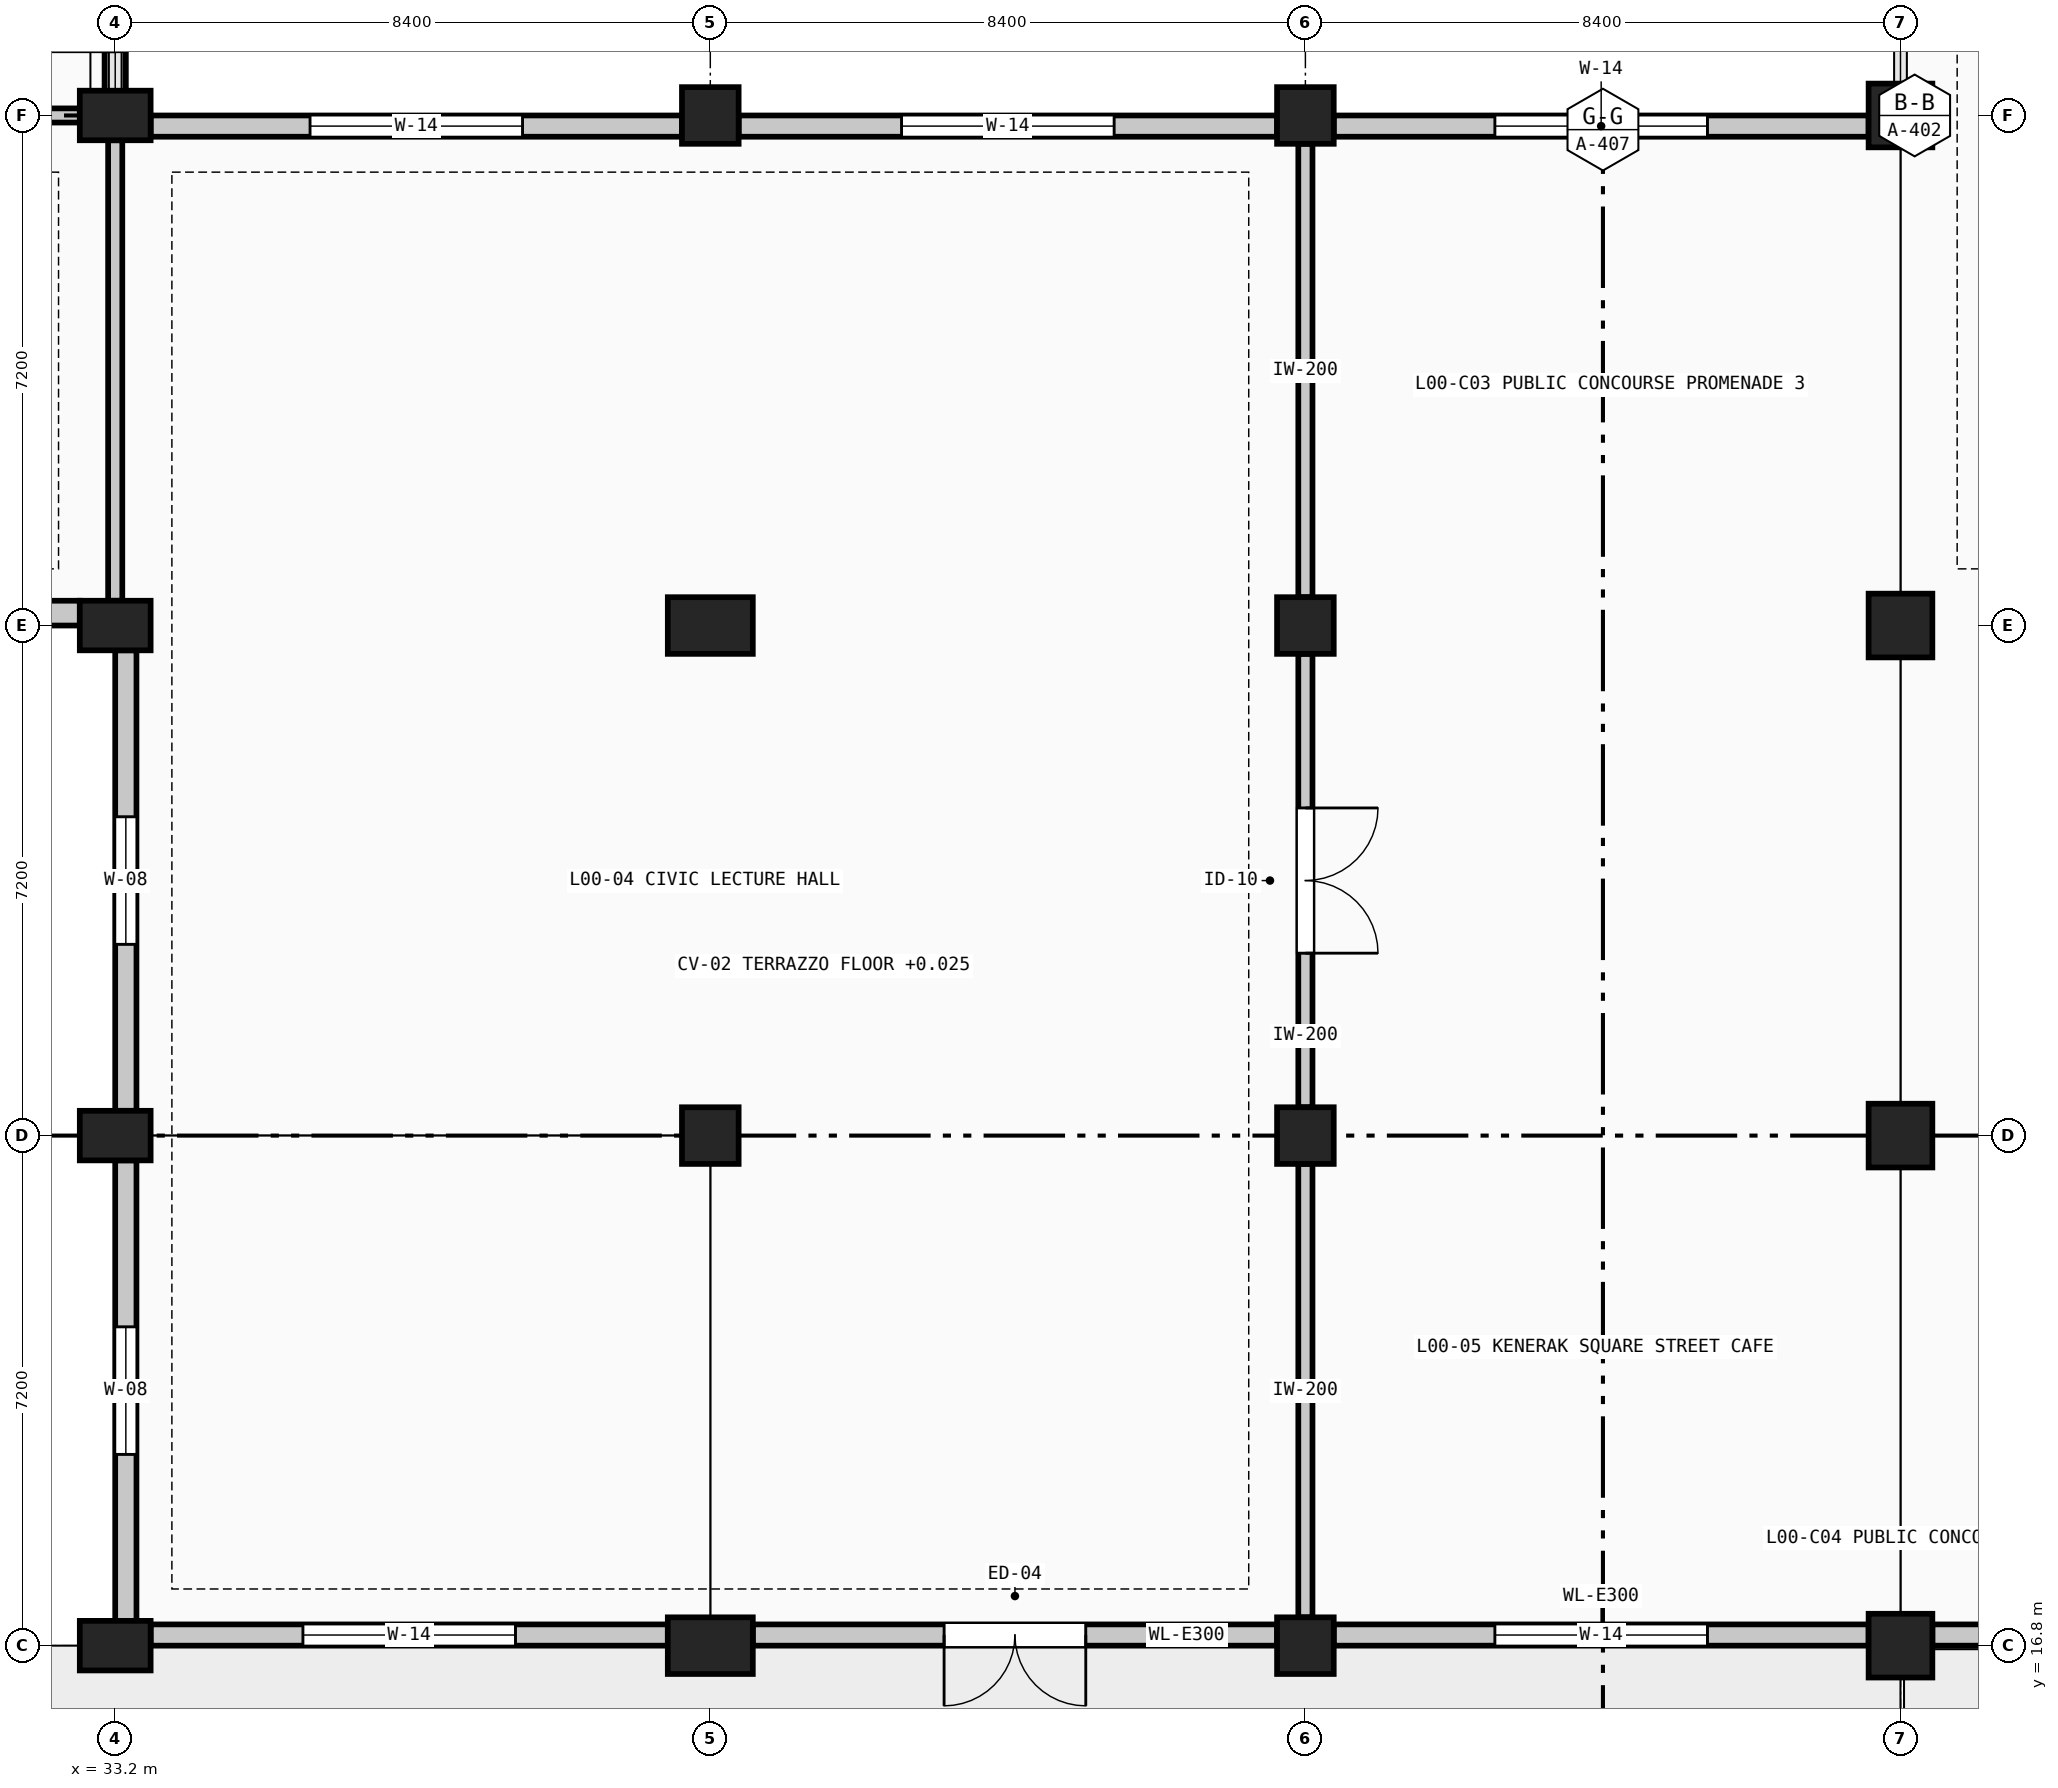
"""IFC4 building model, lengths in metres.
Left out: names, types, materials, properties, quantities, classifications, styles, units other than length and angle.
Written with IfcOpenShell. Run it as: python <this file> out.ifc"""

import sys

from ifc_helpers import new_model, si_unit, direction, frame, frame_2d, origin, origin_2d, place, context, subcontext, project, spatial, rectangle, extrude, element, fill, save


model = new_model("IFC4")
c1 = context("Model", 3, precision=1e-05, world=origin(), true_north=direction((0.0, 1.0)))
c2 = subcontext(c1, "Body", "Model", "MODEL_VIEW")
j1 = project(units=[si_unit("LENGTHUNIT", "METRE"), si_unit("PLANEANGLEUNIT", "RADIAN")], contexts=[c1])
p1 = place(None, origin())
s1 = spatial("IfcSite", under=j1, at=p1, CompositionType="ELEMENT")
p2 = place(p1, origin())
s2 = spatial("IfcBuilding", under=s1, at=p2, CompositionType="ELEMENT")
p3 = place(p2, origin())
s3 = spatial("IfcBuildingStorey", under=s2, at=p3, CompositionType="ELEMENT", Elevation=0.0)
for number, where, z_axis, x_axis in (
    (1, (33.2, 16.8, 0.0), (0.0, 0.0, 1.0), (1.0, 0.0, 0.0)),
    (2, (33.2, 24.0, 0.0), (0.0, 0.0, 1.0), (1.0, 0.0, 0.0)),
    (3, (33.2, 31.2, 0.0), (0.0, 0.0, 1.0), (1.0, 0.0, 0.0)),
    (4, (33.2, 38.4, 0.0), (0.0, 0.0, 1.0), (1.0, 0.0, 0.0)),
):
    element("IfcColumn", number, at=place(p3, frame(where, z_axis=z_axis, x_axis=x_axis)), inside=s3, PredefinedType="COLUMN", context=c2, shape_type="SweptSolid", body=[
        extrude(rectangle(XDim=1.0, YDim=0.7, at=origin_2d()), origin(), (0.0, 0.0, 1.0), 4.8),
    ])
p4 = place(p3, frame((41.6, 16.8, 0.0), z_axis=(0.0, 0.0, 1.0), x_axis=(1.0, 0.0, 0.0)))
e5 = element("IfcColumn", 5, at=p4, inside=s3, PredefinedType="COLUMN", context=c2, shape_type="SweptSolid", body=[
    extrude(rectangle(XDim=1.2, YDim=0.8, at=origin_2d()), origin(), (0.0, 0.0, 1.0), 4.8),
])
p5 = place(p3, frame((41.6, 24.0, 0.0), z_axis=(0.0, 0.0, 1.0), x_axis=(1.0, 0.0, 0.0)))
e6 = element("IfcColumn", 6, at=p5, inside=s3, PredefinedType="COLUMN", context=c2, shape_type="SweptSolid", body=[
    extrude(rectangle(XDim=0.8, YDim=0.8, at=origin_2d()), origin(), (0.0, 0.0, 1.0), 4.8),
])
p6 = place(p3, frame((41.6, 31.2, 0.0), z_axis=(0.0, 0.0, 1.0), x_axis=(1.0, 0.0, 0.0)))
e7 = element("IfcColumn", 7, at=p6, inside=s3, PredefinedType="COLUMN", context=c2, shape_type="SweptSolid", body=[
    extrude(rectangle(XDim=1.2, YDim=0.8, at=origin_2d()), origin(), (0.0, 0.0, 1.0), 4.8),
])
for number, where, z_axis, x_axis in (
    (8, (41.6, 38.4, 0.0), (0.0, 0.0, 1.0), (1.0, 0.0, 0.0)),
    (9, (50.0, 16.8, 0.0), (0.0, 0.0, 1.0), (1.0, 0.0, 0.0)),
    (10, (50.0, 24.0, 0.0), (0.0, 0.0, 1.0), (1.0, 0.0, 0.0)),
    (11, (50.0, 31.2, 0.0), (0.0, 0.0, 1.0), (1.0, 0.0, 0.0)),
    (12, (50.0, 38.4, 0.0), (0.0, 0.0, 1.0), (1.0, 0.0, 0.0)),
):
    element("IfcColumn", number, at=place(p3, frame(where, z_axis=z_axis, x_axis=x_axis)), inside=s3, PredefinedType="COLUMN", context=c2, shape_type="SweptSolid", body=[
        extrude(rectangle(XDim=0.8, YDim=0.8, at=origin_2d()), origin(), (0.0, 0.0, 1.0), 4.8),
    ])
for number, where, z_axis, x_axis in (
    (13, (58.4, 16.8, 0.0), (0.0, 0.0, 1.0), (1.0, 0.0, 0.0)),
    (14, (58.4, 24.0, 0.0), (0.0, 0.0, 1.0), (1.0, 0.0, 0.0)),
    (15, (58.4, 31.2, 0.0), (0.0, 0.0, 1.0), (1.0, 0.0, 0.0)),
    (16, (58.4, 38.4, 0.0), (0.0, 0.0, 1.0), (1.0, 0.0, 0.0)),
):
    element("IfcColumn", number, at=place(p3, frame(where, z_axis=z_axis, x_axis=x_axis)), inside=s3, PredefinedType="COLUMN", context=c2, shape_type="SweptSolid", body=[
        extrude(rectangle(XDim=0.9, YDim=0.9, at=origin_2d()), origin(), (0.0, 0.0, 1.0), 4.8),
    ])
p7 = place(p3, frame((66.35, 16.95, 0.0), z_axis=(0.0, 0.0, 1.0), x_axis=(-1.0, 0.0, 0.0)))
e17 = element("IfcWall", 17, at=p7, inside=s3, PredefinedType="SOLIDWALL", context=c2, shape_type="SweptSolid", body=[
    extrude(rectangle(XDim=7.5, YDim=0.3, at=frame_2d((3.75, 0.0))), origin(), (0.0, 0.0, 1.0), 4.0),
])
p8 = place(p7, frame((2.75, 0.0, 0.0)))
e18 = element("IfcOpeningElement", 18, at=p8, cuts=e17, PredefinedType="OPENING", context=c2, shape_type="SweptSolid", body=[
    extrude(rectangle(XDim=2.0, YDim=2.4, at=frame_2d((1.0, 1.2))), frame((0.0, 0.16, 0.0), z_axis=(0.0, -1.0, 0.0), x_axis=(1.0, 0.0, 0.0)), (0.0, 0.0, 1.0), 0.32),
])
p9 = place(p3, frame((57.95, 16.95, 0.0), z_axis=(0.0, 0.0, 1.0), x_axis=(-1.0, 0.0, 0.0)))
e19 = element("IfcWall", 19, at=p9, inside=s3, PredefinedType="SOLIDWALL", context=c2, shape_type="SweptSolid", body=[
    extrude(rectangle(XDim=7.55, YDim=0.3, at=frame_2d((3.775, 0.0))), origin(), (0.0, 0.0, 1.0), 4.1),
])
p10 = place(p9, frame((2.275, 0.0, 0.75)))
e20 = element("IfcOpeningElement", 20, at=p10, cuts=e19, PredefinedType="OPENING", context=c2, shape_type="SweptSolid", body=[
    extrude(rectangle(XDim=3.0, YDim=2.4, at=frame_2d((1.5, 1.2))), frame((0.0, 0.16, 0.0), z_axis=(0.0, -1.0, 0.0), x_axis=(1.0, 0.0, 0.0)), (0.0, 0.0, 1.0), 0.32),
])
p11 = place(p3, frame((49.6, 16.95, 0.0), z_axis=(0.0, 0.0, 1.0), x_axis=(-1.0, 0.0, 0.0)))
e21 = element("IfcWall", 21, at=p11, inside=s3, PredefinedType="SOLIDWALL", context=c2, shape_type="SweptSolid", body=[
    extrude(rectangle(XDim=7.4, YDim=0.3, at=frame_2d((3.7, 0.0))), origin(), (0.0, 0.0, 1.0), 4.1),
])
p12 = place(p11, frame((2.7, 0.0, 0.0)))
e22 = element("IfcOpeningElement", 22, at=p12, cuts=e21, PredefinedType="OPENING", context=c2, shape_type="SweptSolid", body=[
    extrude(rectangle(XDim=2.0, YDim=2.4, at=frame_2d((1.0, 1.2))), frame((0.0, 0.16, 0.0), z_axis=(0.0, -1.0, 0.0), x_axis=(1.0, 0.0, 0.0)), (0.0, 0.0, 1.0), 0.32),
])
p13 = place(p3, frame((41.0, 16.95, 0.0), z_axis=(0.0, 0.0, 1.0), x_axis=(-1.0, 0.0, 0.0)))
e23 = element("IfcWall", 23, at=p13, inside=s3, PredefinedType="SOLIDWALL", context=c2, shape_type="SweptSolid", body=[
    extrude(rectangle(XDim=7.3, YDim=0.3, at=frame_2d((3.65, 0.0))), origin(), (0.0, 0.0, 1.0), 4.1),
])
p14 = place(p13, frame((2.15, 0.0, 0.75)))
e24 = element("IfcOpeningElement", 24, at=p14, cuts=e23, PredefinedType="OPENING", context=c2, shape_type="SweptSolid", body=[
    extrude(rectangle(XDim=3.0, YDim=2.4, at=frame_2d((1.5, 1.2))), frame((0.0, 0.16, 0.0), z_axis=(0.0, -1.0, 0.0), x_axis=(1.0, 0.0, 0.0)), (0.0, 0.0, 1.0), 0.32),
])
p15 = place(p3, frame((33.35, 17.15, 0.0), z_axis=(0.0, 0.0, 1.0), x_axis=(0.0, 1.0, 0.0)))
e25 = element("IfcWall", 25, at=p15, inside=s3, PredefinedType="SOLIDWALL", context=c2, shape_type="SweptSolid", body=[
    extrude(rectangle(XDim=6.5, YDim=0.3, at=frame_2d((3.25, 0.0))), origin(), (0.0, 0.0, 1.0), 4.2),
])
p16 = place(p15, frame((2.35, 0.0, 2.2)))
e26 = element("IfcOpeningElement", 26, at=p16, cuts=e25, PredefinedType="OPENING", context=c2, shape_type="SweptSolid", body=[
    extrude(rectangle(XDim=1.8, YDim=1.35, at=frame_2d((0.9, 0.675))), frame((0.0, 0.16, 0.0), z_axis=(0.0, -1.0, 0.0), x_axis=(1.0, 0.0, 0.0)), (0.0, 0.0, 1.0), 0.32),
])
p17 = place(p3, frame((33.35, 24.35, 0.0), z_axis=(0.0, 0.0, 1.0), x_axis=(0.0, 1.0, 0.0)))
e27 = element("IfcWall", 27, at=p17, inside=s3, PredefinedType="SOLIDWALL", context=c2, shape_type="SweptSolid", body=[
    extrude(rectangle(XDim=6.5, YDim=0.3, at=frame_2d((3.25, 0.0))), origin(), (0.0, 0.0, 1.0), 4.2),
])
p18 = place(p17, frame((2.35, 0.0, 2.2)))
e28 = element("IfcOpeningElement", 28, at=p18, cuts=e27, PredefinedType="OPENING", context=c2, shape_type="SweptSolid", body=[
    extrude(rectangle(XDim=1.8, YDim=1.35, at=frame_2d((0.9, 0.675))), frame((0.0, 0.16, 0.0), z_axis=(0.0, -1.0, 0.0), x_axis=(1.0, 0.0, 0.0)), (0.0, 0.0, 1.0), 0.32),
])
p19 = place(p3, frame((32.7, 31.375, 0.0), z_axis=(0.0, 0.0, 1.0), x_axis=(-1.0, 0.0, 0.0)))
e29 = element("IfcWall", 29, at=p19, inside=s3, PredefinedType="SOLIDWALL", context=c2, shape_type="SweptSolid", body=[
    extrude(rectangle(XDim=7.4, YDim=0.35, at=frame_2d((3.7, 0.0))), origin(), (0.0, 0.0, 1.0), 4.1),
])
p20 = place(p19, frame((2.8, 0.0, 2.2)))
e30 = element("IfcOpeningElement", 30, at=p20, cuts=e29, PredefinedType="OPENING", context=c2, shape_type="SweptSolid", body=[
    extrude(rectangle(XDim=1.8, YDim=1.35, at=frame_2d((0.9, 0.675))), frame((0.0, 0.185, 0.0), z_axis=(0.0, -1.0, 0.0), x_axis=(1.0, 0.0, 0.0)), (0.0, 0.0, 1.0), 0.37),
])
p21 = place(p3, frame((33.7, 38.25, 0.0), z_axis=(0.0, 0.0, 1.0), x_axis=(1.0, 0.0, 0.0)))
e31 = element("IfcWall", 31, at=p21, inside=s3, PredefinedType="SOLIDWALL", context=c2, shape_type="SweptSolid", body=[
    extrude(rectangle(XDim=7.5, YDim=0.3, at=frame_2d((3.75, 0.0))), origin(), (0.0, 0.0, 1.0), 4.1),
])
p22 = place(p21, frame((2.25, 0.0, 0.75)))
e32 = element("IfcOpeningElement", 32, at=p22, cuts=e31, PredefinedType="OPENING", context=c2, shape_type="SweptSolid", body=[
    extrude(rectangle(XDim=3.0, YDim=2.4, at=frame_2d((1.5, 1.2))), frame((0.0, 0.16, 0.0), z_axis=(0.0, -1.0, 0.0), x_axis=(1.0, 0.0, 0.0)), (0.0, 0.0, 1.0), 0.32),
])
p23 = place(p3, frame((42.0, 38.25, 0.0), z_axis=(0.0, 0.0, 1.0), x_axis=(1.0, 0.0, 0.0)))
e33 = element("IfcWall", 33, at=p23, inside=s3, PredefinedType="SOLIDWALL", context=c2, shape_type="SweptSolid", body=[
    extrude(rectangle(XDim=7.6, YDim=0.3, at=frame_2d((3.8, 0.0))), origin(), (0.0, 0.0, 1.0), 4.1),
])
p24 = place(p23, frame((2.3, 0.0, 0.75)))
e34 = element("IfcOpeningElement", 34, at=p24, cuts=e33, PredefinedType="OPENING", context=c2, shape_type="SweptSolid", body=[
    extrude(rectangle(XDim=3.0, YDim=2.4, at=frame_2d((1.5, 1.2))), frame((0.0, 0.16, 0.0), z_axis=(0.0, -1.0, 0.0), x_axis=(1.0, 0.0, 0.0)), (0.0, 0.0, 1.0), 0.32),
])
p25 = place(p3, frame((50.4, 38.25, 0.0), z_axis=(0.0, 0.0, 1.0), x_axis=(1.0, 0.0, 0.0)))
e35 = element("IfcWall", 35, at=p25, inside=s3, PredefinedType="SOLIDWALL", context=c2, shape_type="SweptSolid", body=[
    extrude(rectangle(XDim=7.55, YDim=0.3, at=frame_2d((3.775, 0.0))), origin(), (0.0, 0.0, 1.0), 4.1),
])
p26 = place(p25, frame((2.275, 0.0, 0.75)))
e36 = element("IfcOpeningElement", 36, at=p26, cuts=e35, PredefinedType="OPENING", context=c2, shape_type="SweptSolid", body=[
    extrude(rectangle(XDim=3.0, YDim=2.4, at=frame_2d((1.5, 1.2))), frame((0.0, 0.16, 0.0), z_axis=(0.0, -1.0, 0.0), x_axis=(1.0, 0.0, 0.0)), (0.0, 0.0, 1.0), 0.32),
])
p27 = place(p3, frame((33.2, 38.4, 0.0), z_axis=(0.0, 0.0, 1.0), x_axis=(0.0, 1.0, 0.0)))
e37 = element("IfcWall", 37, at=p27, inside=s3, PredefinedType="SOLIDWALL", context=c2, shape_type="SweptSolid", body=[
    extrude(rectangle(XDim=4.2, YDim=0.3, at=frame_2d((2.1, 0.0))), origin(), (0.0, 0.0, 1.0), 3.0),
])
p28 = place(p27, frame((0.9, 0.0, 0.0)))
e38 = element("IfcOpeningElement", 38, at=p28, cuts=e37, PredefinedType="OPENING", context=c2, shape_type="SweptSolid", body=[
    extrude(rectangle(XDim=2.4, YDim=2.2, at=frame_2d((1.2, 1.1))), frame((0.0, 0.16, 0.0), z_axis=(0.0, -1.0, 0.0), x_axis=(1.0, 0.0, 0.0)), (0.0, 0.0, 1.0), 0.32),
])
p29 = place(p3, frame((50.0, 38.0, 0.0), z_axis=(0.0, 0.0, 1.0), x_axis=(0.0, -1.0, 0.0)))
e39 = element("IfcWall", 39, at=p29, inside=s3, PredefinedType="PARTITIONING", context=c2, shape_type="SweptSolid", body=[
    extrude(rectangle(XDim=6.4, YDim=0.2, at=frame_2d((3.2, 0.0))), origin(), (0.0, 0.0, 1.0), 4.05),
])
p30 = place(p3, frame((50.0, 30.8, 0.0), z_axis=(0.0, 0.0, 1.0), x_axis=(0.0, -1.0, 0.0)))
e40 = element("IfcWall", 40, at=p30, inside=s3, PredefinedType="PARTITIONING", context=c2, shape_type="SweptSolid", body=[
    extrude(rectangle(XDim=6.4, YDim=0.2, at=frame_2d((3.2, 0.0))), origin(), (0.0, 0.0, 1.0), 4.05),
])
p31 = place(p30, frame((2.175, 0.0, 0.0)))
e41 = element("IfcOpeningElement", 41, at=p31, cuts=e40, PredefinedType="OPENING", context=c2, shape_type="SweptSolid", body=[
    extrude(rectangle(XDim=2.05, YDim=2.4, at=frame_2d((1.025, 1.2))), frame((0.0, 0.11, 0.0), z_axis=(0.0, -1.0, 0.0), x_axis=(1.0, 0.0, 0.0)), (0.0, 0.0, 1.0), 0.22),
])
p32 = place(p3, frame((50.0, 23.6, 0.0), z_axis=(0.0, 0.0, 1.0), x_axis=(0.0, -1.0, 0.0)))
e42 = element("IfcWall", 42, at=p32, inside=s3, PredefinedType="PARTITIONING", context=c2, shape_type="SweptSolid", body=[
    extrude(rectangle(XDim=6.4, YDim=0.2, at=frame_2d((3.2, 0.0))), origin(), (0.0, 0.0, 1.0), 4.05),
])
p33 = place(p3, frame((32.7, 38.4, 0.0), z_axis=(0.0, 0.0, 1.0), x_axis=(-1.0, 0.0, 0.0)))
e43 = element("IfcWall", 43, at=p33, inside=s3, PredefinedType="PARTITIONING", context=c2, shape_type="SweptSolid", body=[
    extrude(rectangle(XDim=7.9, YDim=0.2, at=frame_2d((3.95, 0.0))), origin(), (0.0, 0.0, 1.0), 4.525),
])
p34 = place(p3, frame((33.2, 31.55, 0.0), z_axis=(0.0, 0.0, 1.0), x_axis=(0.0, 1.0, 0.0)))
e44 = element("IfcWall", 44, at=p34, inside=s3, PredefinedType="PARTITIONING", context=c2, shape_type="SweptSolid", body=[
    extrude(rectangle(XDim=6.5, YDim=0.2, at=frame_2d((3.25, 0.0))), origin(), (0.0, 0.0, 1.0), 4.05),
])
p35 = place(p10, origin())
e45 = element("IfcWindow", 45, at=p35, inside=s3, PartitioningType="SINGLE_PANEL", PredefinedType="WINDOW", context=c2, shape_type="SweptSolid", body=[
    extrude(rectangle(XDim=3.0, YDim=2.4, at=frame_2d((1.5, 1.2))), frame((0.0, 0.03, 0.0), z_axis=(0.0, -1.0, 0.0), x_axis=(1.0, 0.0, 0.0)), (0.0, 0.0, 1.0), 0.06),
])
fill(e20, e45)
p36 = place(p12, origin())
e46 = element("IfcDoor", 46, at=p36, inside=s3, OperationType="DOUBLE_DOOR_SINGLE_SWING", PredefinedType="DOOR", context=c2, shape_type="SweptSolid", body=[
    extrude(rectangle(XDim=2.0, YDim=2.4, at=frame_2d((1.0, 1.2))), frame((0.0, 0.025, 0.0), z_axis=(0.0, -1.0, 0.0), x_axis=(1.0, 0.0, 0.0)), (0.0, 0.0, 1.0), 0.05),
])
fill(e22, e46)
p37 = place(p14, origin())
e47 = element("IfcWindow", 47, at=p37, inside=s3, PartitioningType="SINGLE_PANEL", PredefinedType="WINDOW", context=c2, shape_type="SweptSolid", body=[
    extrude(rectangle(XDim=3.0, YDim=2.4, at=frame_2d((1.5, 1.2))), frame((0.0, 0.03, 0.0), z_axis=(0.0, -1.0, 0.0), x_axis=(1.0, 0.0, 0.0)), (0.0, 0.0, 1.0), 0.06),
])
fill(e24, e47)
p38 = place(p16, origin())
e48 = element("IfcWindow", 48, at=p38, inside=s3, PartitioningType="SINGLE_PANEL", PredefinedType="WINDOW", context=c2, shape_type="SweptSolid", body=[
    extrude(rectangle(XDim=1.8, YDim=1.35, at=frame_2d((0.9, 0.675))), frame((0.0, 0.03, 0.0), z_axis=(0.0, -1.0, 0.0), x_axis=(1.0, 0.0, 0.0)), (0.0, 0.0, 1.0), 0.06),
])
fill(e26, e48)
p39 = place(p18, origin())
e49 = element("IfcWindow", 49, at=p39, inside=s3, PartitioningType="SINGLE_PANEL", PredefinedType="WINDOW", context=c2, shape_type="SweptSolid", body=[
    extrude(rectangle(XDim=1.8, YDim=1.35, at=frame_2d((0.9, 0.675))), frame((0.0, 0.03, 0.0), z_axis=(0.0, -1.0, 0.0), x_axis=(1.0, 0.0, 0.0)), (0.0, 0.0, 1.0), 0.06),
])
fill(e28, e49)
p40 = place(p22, origin())
e50 = element("IfcWindow", 50, at=p40, inside=s3, PartitioningType="SINGLE_PANEL", PredefinedType="WINDOW", context=c2, shape_type="SweptSolid", body=[
    extrude(rectangle(XDim=3.0, YDim=2.4, at=frame_2d((1.5, 1.2))), frame((0.0, 0.03, 0.0), z_axis=(0.0, -1.0, 0.0), x_axis=(1.0, 0.0, 0.0)), (0.0, 0.0, 1.0), 0.06),
])
fill(e32, e50)
p41 = place(p24, origin())
e51 = element("IfcWindow", 51, at=p41, inside=s3, PartitioningType="SINGLE_PANEL", PredefinedType="WINDOW", context=c2, shape_type="SweptSolid", body=[
    extrude(rectangle(XDim=3.0, YDim=2.4, at=frame_2d((1.5, 1.2))), frame((0.0, 0.03, 0.0), z_axis=(0.0, -1.0, 0.0), x_axis=(1.0, 0.0, 0.0)), (0.0, 0.0, 1.0), 0.06),
])
fill(e34, e51)
p42 = place(p26, origin())
e52 = element("IfcWindow", 52, at=p42, inside=s3, PartitioningType="SINGLE_PANEL", PredefinedType="WINDOW", context=c2, shape_type="SweptSolid", body=[
    extrude(rectangle(XDim=3.0, YDim=2.4, at=frame_2d((1.5, 1.2))), frame((0.0, 0.03, 0.0), z_axis=(0.0, -1.0, 0.0), x_axis=(1.0, 0.0, 0.0)), (0.0, 0.0, 1.0), 0.06),
])
fill(e36, e52)
p43 = place(p31, origin())
e53 = element("IfcDoor", 53, at=p43, inside=s3, OperationType="DOUBLE_DOOR_SINGLE_SWING", PredefinedType="DOOR", context=c2, shape_type="SweptSolid", body=[
    extrude(rectangle(XDim=2.05, YDim=2.4, at=frame_2d((1.025, 1.2))), frame((0.0, 0.025, 0.0), z_axis=(0.0, -1.0, 0.0), x_axis=(1.0, 0.0, 0.0)), (0.0, 0.0, 1.0), 0.05),
])
fill(e41, e53)
save(model, sys.argv[1])
